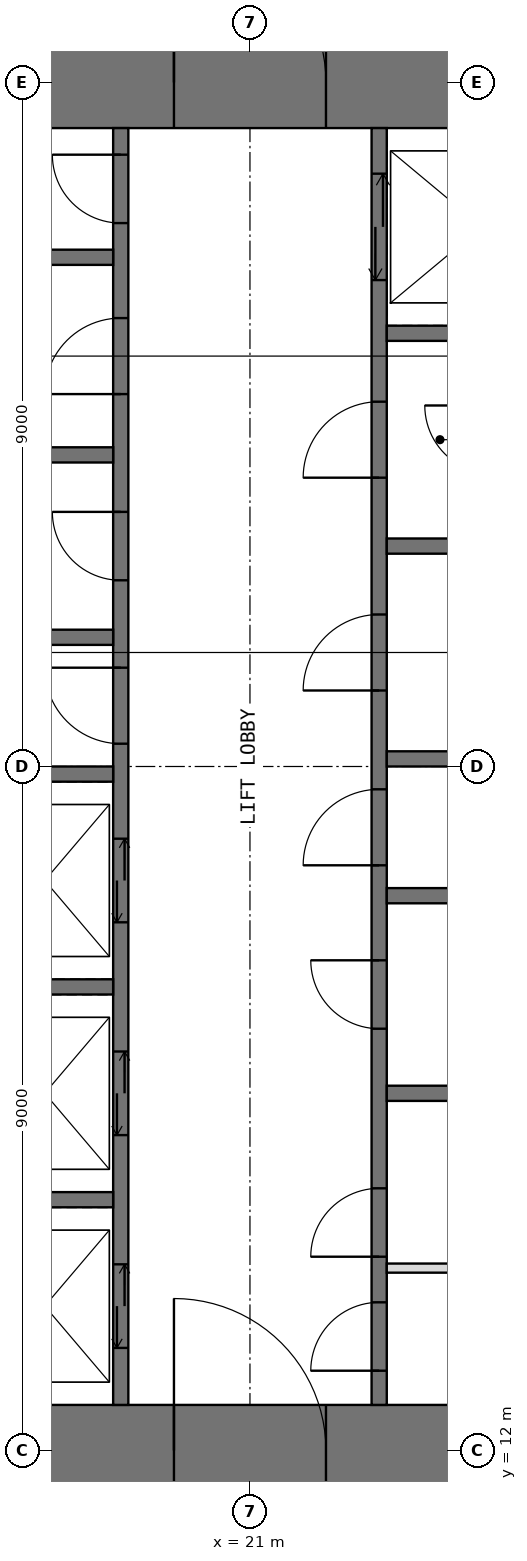
"""IFC4 building model, lengths in metres.
Left out: names, types, materials, properties, quantities, classifications, styles, units other than length and angle.
Written with IfcOpenShell. Run it as: python <this file> out.ifc"""

import sys

from ifc_helpers import new_model, si_unit, direction, frame, frame_2d, origin, place, context, subcontext, project, spatial, rectangle, extrude, element, fill, save


model = new_model("IFC4")
c1 = context("Model", 3, precision=1e-05, world=origin(), true_north=direction((0.0, 1.0)))
c2 = subcontext(c1, "Body", "Model", "MODEL_VIEW")
j1 = project(units=[si_unit("LENGTHUNIT", "METRE"), si_unit("PLANEANGLEUNIT", "RADIAN")], contexts=[c1])
p1 = place(None, origin())
s1 = spatial("IfcSite", under=j1, at=p1, CompositionType="ELEMENT")
p2 = place(p1, origin())
s2 = spatial("IfcBuilding", under=s1, at=p2, CompositionType="ELEMENT")
p3 = place(p2, frame((0.0, 0.0, 239.5)))
s3 = spatial("IfcBuildingStorey", under=s2, at=p3, CompositionType="ELEMENT", Elevation=239.5)
p4 = place(p3, frame((11.4, 12.0, -0.05), z_axis=(0.0, 0.0, 1.0), x_axis=(1.0, 0.0, 0.0)))
e1 = element("IfcWall", 1, at=p4, inside=s3, PredefinedType="SHEAR", context=c2, shape_type="SweptSolid", body=[
    extrude(rectangle(XDim=19.2, YDim=1.2, at=frame_2d((9.6, 0.0))), origin(), (0.0, 0.0, 1.0), 4.5),
])
p5 = place(p4, frame((8.6, 0.0, 0.05)))
e2 = element("IfcOpeningElement", 2, at=p5, cuts=e1, PredefinedType="OPENING", context=c2, shape_type="SweptSolid", body=[
    extrude(rectangle(XDim=2.0, YDim=2.2, at=frame_2d((1.0, 1.1))), frame((0.0, 0.61, 0.0), z_axis=(0.0, -1.0, 0.0), x_axis=(1.0, 0.0, 0.0)), (0.0, 0.0, 1.0), 1.22),
])
p6 = place(p3, frame((11.4, 30.0, -0.05), z_axis=(0.0, 0.0, 1.0), x_axis=(1.0, 0.0, 0.0)))
e3 = element("IfcWall", 3, at=p6, inside=s3, PredefinedType="SHEAR", context=c2, shape_type="SweptSolid", body=[
    extrude(rectangle(XDim=19.2, YDim=1.2, at=frame_2d((9.6, 0.0))), origin(), (0.0, 0.0, 1.0), 4.5),
])
p7 = place(p6, frame((8.6, 0.0, 0.05)))
e4 = element("IfcOpeningElement", 4, at=p7, cuts=e3, PredefinedType="OPENING", context=c2, shape_type="SweptSolid", body=[
    extrude(rectangle(XDim=2.0, YDim=2.2, at=frame_2d((1.0, 1.1))), frame((0.0, 0.61, 0.0), z_axis=(0.0, -1.0, 0.0), x_axis=(1.0, 0.0, 0.0)), (0.0, 0.0, 1.0), 1.22),
])
p8 = place(p3, frame((19.3, 12.6, -0.05), z_axis=(0.0, 0.0, 1.0), x_axis=(0.0, 1.0, 0.0)))
e5 = element("IfcWall", 5, at=p8, inside=s3, PredefinedType="SHEAR", context=c2, shape_type="SweptSolid", body=[
    extrude(rectangle(XDim=16.8, YDim=0.2, at=frame_2d((8.4, 0.0))), origin(), (0.0, 0.0, 1.0), 4.5),
])
p9 = place(p8, frame((8.7, 0.0, 0.05)))
e6 = element("IfcOpeningElement", 6, at=p9, cuts=e5, PredefinedType="OPENING", context=c2, shape_type="SweptSolid", body=[
    extrude(rectangle(XDim=1.0, YDim=2.2, at=frame_2d((0.5, 1.1))), frame((0.0, 0.11, 0.0), z_axis=(0.0, -1.0, 0.0), x_axis=(1.0, 0.0, 0.0)), (0.0, 0.0, 1.0), 0.22),
])
p10 = place(p8, frame((10.85, 0.0, 0.05)))
e7 = element("IfcOpeningElement", 7, at=p10, cuts=e5, PredefinedType="OPENING", context=c2, shape_type="SweptSolid", body=[
    extrude(rectangle(XDim=0.9, YDim=2.2, at=frame_2d((0.45, 1.1))), frame((0.0, 0.11, 0.0), z_axis=(0.0, -1.0, 0.0), x_axis=(1.0, 0.0, 0.0)), (0.0, 0.0, 1.0), 0.22),
])
p11 = place(p8, frame((13.3, 0.0, 0.05)))
e8 = element("IfcOpeningElement", 8, at=p11, cuts=e5, PredefinedType="OPENING", context=c2, shape_type="SweptSolid", body=[
    extrude(rectangle(XDim=1.0, YDim=2.2, at=frame_2d((0.5, 1.1))), frame((0.0, 0.11, 0.0), z_axis=(0.0, -1.0, 0.0), x_axis=(1.0, 0.0, 0.0)), (0.0, 0.0, 1.0), 0.22),
])
p12 = place(p8, frame((15.55, 0.0, 0.05)))
e9 = element("IfcOpeningElement", 9, at=p12, cuts=e5, PredefinedType="OPENING", context=c2, shape_type="SweptSolid", body=[
    extrude(rectangle(XDim=0.9, YDim=2.2, at=frame_2d((0.45, 1.1))), frame((0.0, 0.11, 0.0), z_axis=(0.0, -1.0, 0.0), x_axis=(1.0, 0.0, 0.0)), (0.0, 0.0, 1.0), 0.22),
])
p13 = place(p8, frame((0.75, 0.0, 0.05)))
e10 = element("IfcOpeningElement", 10, at=p13, cuts=e5, PredefinedType="OPENING", context=c2, shape_type="SweptSolid", body=[
    extrude(rectangle(XDim=1.1, YDim=2.2, at=frame_2d((0.55, 1.1))), frame((0.0, 0.11, 0.0), z_axis=(0.0, -1.0, 0.0), x_axis=(1.0, 0.0, 0.0)), (0.0, 0.0, 1.0), 0.22),
])
p14 = place(p8, frame((3.55, 0.0, 0.05)))
e11 = element("IfcOpeningElement", 11, at=p14, cuts=e5, PredefinedType="OPENING", context=c2, shape_type="SweptSolid", body=[
    extrude(rectangle(XDim=1.1, YDim=2.2, at=frame_2d((0.55, 1.1))), frame((0.0, 0.11, 0.0), z_axis=(0.0, -1.0, 0.0), x_axis=(1.0, 0.0, 0.0)), (0.0, 0.0, 1.0), 0.22),
])
p15 = place(p8, frame((6.35, 0.0, 0.05)))
e12 = element("IfcOpeningElement", 12, at=p15, cuts=e5, PredefinedType="OPENING", context=c2, shape_type="SweptSolid", body=[
    extrude(rectangle(XDim=1.1, YDim=2.2, at=frame_2d((0.55, 1.1))), frame((0.0, 0.11, 0.0), z_axis=(0.0, -1.0, 0.0), x_axis=(1.0, 0.0, 0.0)), (0.0, 0.0, 1.0), 0.22),
])
p16 = place(p3, frame((22.7, 12.6, -0.05), z_axis=(0.0, 0.0, 1.0), x_axis=(0.0, 1.0, 0.0)))
e13 = element("IfcWall", 13, at=p16, inside=s3, PredefinedType="SHEAR", context=c2, shape_type="SweptSolid", body=[
    extrude(rectangle(XDim=16.8, YDim=0.2, at=frame_2d((8.4, 0.0))), origin(), (0.0, 0.0, 1.0), 4.5),
])
p17 = place(p16, frame((0.45, 0.0, 0.05)))
e14 = element("IfcOpeningElement", 14, at=p17, cuts=e13, PredefinedType="OPENING", context=c2, shape_type="SweptSolid", body=[
    extrude(rectangle(XDim=0.9, YDim=2.2, at=frame_2d((0.45, 1.1))), frame((0.0, 0.11, 0.0), z_axis=(0.0, -1.0, 0.0), x_axis=(1.0, 0.0, 0.0)), (0.0, 0.0, 1.0), 0.22),
])
p18 = place(p16, frame((7.1, 0.0, 0.05)))
e15 = element("IfcOpeningElement", 15, at=p18, cuts=e13, PredefinedType="OPENING", context=c2, shape_type="SweptSolid", body=[
    extrude(rectangle(XDim=1.0, YDim=2.2, at=frame_2d((0.5, 1.1))), frame((0.0, 0.11, 0.0), z_axis=(0.0, -1.0, 0.0), x_axis=(1.0, 0.0, 0.0)), (0.0, 0.0, 1.0), 0.22),
])
p19 = place(p16, frame((1.95, 0.0, 0.05)))
e16 = element("IfcOpeningElement", 16, at=p19, cuts=e13, PredefinedType="OPENING", context=c2, shape_type="SweptSolid", body=[
    extrude(rectangle(XDim=0.9, YDim=2.2, at=frame_2d((0.45, 1.1))), frame((0.0, 0.11, 0.0), z_axis=(0.0, -1.0, 0.0), x_axis=(1.0, 0.0, 0.0)), (0.0, 0.0, 1.0), 0.22),
])
p20 = place(p16, frame((4.95, 0.0, 0.05)))
e17 = element("IfcOpeningElement", 17, at=p20, cuts=e13, PredefinedType="OPENING", context=c2, shape_type="SweptSolid", body=[
    extrude(rectangle(XDim=0.9, YDim=2.2, at=frame_2d((0.45, 1.1))), frame((0.0, 0.11, 0.0), z_axis=(0.0, -1.0, 0.0), x_axis=(1.0, 0.0, 0.0)), (0.0, 0.0, 1.0), 0.22),
])
p21 = place(p16, frame((9.4, 0.0, 0.05)))
e18 = element("IfcOpeningElement", 18, at=p21, cuts=e13, PredefinedType="OPENING", context=c2, shape_type="SweptSolid", body=[
    extrude(rectangle(XDim=1.0, YDim=2.2, at=frame_2d((0.5, 1.1))), frame((0.0, 0.11, 0.0), z_axis=(0.0, -1.0, 0.0), x_axis=(1.0, 0.0, 0.0)), (0.0, 0.0, 1.0), 0.22),
])
p22 = place(p16, frame((12.2, 0.0, 0.05)))
e19 = element("IfcOpeningElement", 19, at=p22, cuts=e13, PredefinedType="OPENING", context=c2, shape_type="SweptSolid", body=[
    extrude(rectangle(XDim=1.0, YDim=2.2, at=frame_2d((0.5, 1.1))), frame((0.0, 0.11, 0.0), z_axis=(0.0, -1.0, 0.0), x_axis=(1.0, 0.0, 0.0)), (0.0, 0.0, 1.0), 0.22),
])
p23 = place(p16, frame((14.8, 0.0, 0.05)))
e20 = element("IfcOpeningElement", 20, at=p23, cuts=e13, PredefinedType="OPENING", context=c2, shape_type="SweptSolid", body=[
    extrude(rectangle(XDim=1.4, YDim=2.4, at=frame_2d((0.7, 1.2))), frame((0.0, 0.11, 0.0), z_axis=(0.0, -1.0, 0.0), x_axis=(1.0, 0.0, 0.0)), (0.0, 0.0, 1.0), 0.22),
])
for number, where, z_axis, x_axis in (
    (21, (16.0, 15.3, -0.05), (0.0, 0.0, 1.0), (1.0, 0.0, 0.0)),
    (22, (16.0, 18.1, -0.05), (0.0, 0.0, 1.0), (1.0, 0.0, 0.0)),
    (23, (16.0, 20.9, -0.05), (0.0, 0.0, 1.0), (1.0, 0.0, 0.0)),
    (24, (16.0, 22.7, -0.05), (0.0, 0.0, 1.0), (1.0, 0.0, 0.0)),
    (25, (16.0, 25.1, -0.05), (0.0, 0.0, 1.0), (1.0, 0.0, 0.0)),
    (26, (16.0, 27.7, -0.05), (0.0, 0.0, 1.0), (1.0, 0.0, 0.0)),
    (27, (22.8, 16.7, -0.05), (0.0, 0.0, 1.0), (1.0, 0.0, 0.0)),
    (28, (22.8, 19.3, -0.05), (0.0, 0.0, 1.0), (1.0, 0.0, 0.0)),
    (29, (22.8, 21.1, -0.05), (0.0, 0.0, 1.0), (1.0, 0.0, 0.0)),
    (30, (22.8, 23.9, -0.05), (0.0, 0.0, 1.0), (1.0, 0.0, 0.0)),
    (31, (22.8, 26.7, -0.05), (0.0, 0.0, 1.0), (1.0, 0.0, 0.0)),
):
    element("IfcWall", number, at=place(p3, frame(where, z_axis=z_axis, x_axis=x_axis)), inside=s3, PredefinedType="SHEAR", context=c2, shape_type="SweptSolid", body=[
        extrude(rectangle(XDim=3.2, YDim=0.2, at=frame_2d((1.6, 0.0))), origin(), (0.0, 0.0, 1.0), 4.5),
    ])
p24 = place(p3, frame((22.8, 14.4, 0.0), z_axis=(0.0, 0.0, 1.0), x_axis=(1.0, 0.0, 0.0)))
e32 = element("IfcWall", 32, at=p24, inside=s3, PredefinedType="PARTITIONING", context=c2, shape_type="SweptSolid", body=[
    extrude(rectangle(XDim=3.2, YDim=0.12, at=frame_2d((1.6, 0.0))), origin(), (0.0, 0.0, 1.0), 4.25),
])
p25 = place(p5, origin())
e33 = element("IfcDoor", 33, at=p25, inside=s3, OperationType="DOUBLE_DOOR_SINGLE_SWING", PredefinedType="DOOR", context=c2, shape_type="SweptSolid", body=[
    extrude(rectangle(XDim=2.0, YDim=2.2, at=frame_2d((1.0, 1.1))), frame((0.0, 0.025, 0.0), z_axis=(0.0, -1.0, 0.0), x_axis=(1.0, 0.0, 0.0)), (0.0, 0.0, 1.0), 0.05),
])
fill(e2, e33)
p26 = place(p7, origin())
e34 = element("IfcDoor", 34, at=p26, inside=s3, OperationType="DOUBLE_DOOR_SINGLE_SWING", PredefinedType="DOOR", context=c2, shape_type="SweptSolid", body=[
    extrude(rectangle(XDim=2.0, YDim=2.2, at=frame_2d((1.0, 1.1))), frame((0.0, 0.025, 0.0), z_axis=(0.0, -1.0, 0.0), x_axis=(1.0, 0.0, 0.0)), (0.0, 0.0, 1.0), 0.05),
])
fill(e4, e34)
p27 = place(p17, origin())
e35 = element("IfcDoor", 35, at=p27, inside=s3, OperationType="SINGLE_SWING_LEFT", PredefinedType="DOOR", context=c2, shape_type="SweptSolid", body=[
    extrude(rectangle(XDim=0.9, YDim=2.2, at=frame_2d((0.45, 1.1))), frame((0.0, 0.025, 0.0), z_axis=(0.0, -1.0, 0.0), x_axis=(1.0, 0.0, 0.0)), (0.0, 0.0, 1.0), 0.05),
])
fill(e14, e35)
p28 = place(p9, origin())
e36 = element("IfcDoor", 36, at=p28, inside=s3, OperationType="SINGLE_SWING_RIGHT", PredefinedType="DOOR", context=c2, shape_type="SweptSolid", body=[
    extrude(rectangle(XDim=1.0, YDim=2.2, at=frame_2d((0.5, 1.1))), frame((0.0, 0.025, 0.0), z_axis=(0.0, -1.0, 0.0), x_axis=(1.0, 0.0, 0.0)), (0.0, 0.0, 1.0), 0.05),
])
fill(e6, e36)
p29 = place(p18, origin())
e37 = element("IfcDoor", 37, at=p29, inside=s3, OperationType="SINGLE_SWING_LEFT", PredefinedType="DOOR", context=c2, shape_type="SweptSolid", body=[
    extrude(rectangle(XDim=1.0, YDim=2.2, at=frame_2d((0.5, 1.1))), frame((0.0, 0.025, 0.0), z_axis=(0.0, -1.0, 0.0), x_axis=(1.0, 0.0, 0.0)), (0.0, 0.0, 1.0), 0.05),
])
fill(e15, e37)
p30 = place(p10, origin())
e38 = element("IfcDoor", 38, at=p30, inside=s3, OperationType="SINGLE_SWING_RIGHT", PredefinedType="DOOR", context=c2, shape_type="SweptSolid", body=[
    extrude(rectangle(XDim=0.9, YDim=2.2, at=frame_2d((0.45, 1.1))), frame((0.0, 0.025, 0.0), z_axis=(0.0, -1.0, 0.0), x_axis=(1.0, 0.0, 0.0)), (0.0, 0.0, 1.0), 0.05),
])
fill(e7, e38)
p31 = place(p11, origin())
e39 = element("IfcDoor", 39, at=p31, inside=s3, OperationType="SINGLE_SWING_LEFT", PredefinedType="DOOR", context=c2, shape_type="SweptSolid", body=[
    extrude(rectangle(XDim=1.0, YDim=2.2, at=frame_2d((0.5, 1.1))), frame((0.0, 0.025, 0.0), z_axis=(0.0, -1.0, 0.0), x_axis=(1.0, 0.0, 0.0)), (0.0, 0.0, 1.0), 0.05),
])
fill(e8, e39)
p32 = place(p12, origin())
e40 = element("IfcDoor", 40, at=p32, inside=s3, OperationType="SINGLE_SWING_RIGHT", PredefinedType="DOOR", context=c2, shape_type="SweptSolid", body=[
    extrude(rectangle(XDim=0.9, YDim=2.2, at=frame_2d((0.45, 1.1))), frame((0.0, 0.025, 0.0), z_axis=(0.0, -1.0, 0.0), x_axis=(1.0, 0.0, 0.0)), (0.0, 0.0, 1.0), 0.05),
])
fill(e9, e40)
p33 = place(p19, origin())
e41 = element("IfcDoor", 41, at=p33, inside=s3, OperationType="SINGLE_SWING_LEFT", PredefinedType="DOOR", context=c2, shape_type="SweptSolid", body=[
    extrude(rectangle(XDim=0.9, YDim=2.2, at=frame_2d((0.45, 1.1))), frame((0.0, 0.025, 0.0), z_axis=(0.0, -1.0, 0.0), x_axis=(1.0, 0.0, 0.0)), (0.0, 0.0, 1.0), 0.05),
])
fill(e16, e41)
p34 = place(p20, origin())
e42 = element("IfcDoor", 42, at=p34, inside=s3, OperationType="SINGLE_SWING_RIGHT", PredefinedType="DOOR", context=c2, shape_type="SweptSolid", body=[
    extrude(rectangle(XDim=0.9, YDim=2.2, at=frame_2d((0.45, 1.1))), frame((0.0, 0.025, 0.0), z_axis=(0.0, -1.0, 0.0), x_axis=(1.0, 0.0, 0.0)), (0.0, 0.0, 1.0), 0.05),
])
fill(e17, e42)
p35 = place(p21, origin())
e43 = element("IfcDoor", 43, at=p35, inside=s3, OperationType="SINGLE_SWING_LEFT", PredefinedType="DOOR", context=c2, shape_type="SweptSolid", body=[
    extrude(rectangle(XDim=1.0, YDim=2.2, at=frame_2d((0.5, 1.1))), frame((0.0, 0.025, 0.0), z_axis=(0.0, -1.0, 0.0), x_axis=(1.0, 0.0, 0.0)), (0.0, 0.0, 1.0), 0.05),
])
fill(e18, e43)
p36 = place(p22, origin())
e44 = element("IfcDoor", 44, at=p36, inside=s3, OperationType="SINGLE_SWING_LEFT", PredefinedType="DOOR", context=c2, shape_type="SweptSolid", body=[
    extrude(rectangle(XDim=1.0, YDim=2.2, at=frame_2d((0.5, 1.1))), frame((0.0, 0.025, 0.0), z_axis=(0.0, -1.0, 0.0), x_axis=(1.0, 0.0, 0.0)), (0.0, 0.0, 1.0), 0.05),
])
fill(e19, e44)
p37 = place(p13, origin())
e45 = element("IfcDoor", 45, at=p37, inside=s3, OperationType="DOUBLE_DOOR_SLIDING", PredefinedType="DOOR", context=c2, shape_type="SweptSolid", body=[
    extrude(rectangle(XDim=1.1, YDim=2.2, at=frame_2d((0.55, 1.1))), frame((0.0, 0.025, 0.0), z_axis=(0.0, -1.0, 0.0), x_axis=(1.0, 0.0, 0.0)), (0.0, 0.0, 1.0), 0.05),
])
fill(e10, e45)
p38 = place(p14, origin())
e46 = element("IfcDoor", 46, at=p38, inside=s3, OperationType="DOUBLE_DOOR_SLIDING", PredefinedType="DOOR", context=c2, shape_type="SweptSolid", body=[
    extrude(rectangle(XDim=1.1, YDim=2.2, at=frame_2d((0.55, 1.1))), frame((0.0, 0.025, 0.0), z_axis=(0.0, -1.0, 0.0), x_axis=(1.0, 0.0, 0.0)), (0.0, 0.0, 1.0), 0.05),
])
fill(e11, e46)
p39 = place(p15, origin())
e47 = element("IfcDoor", 47, at=p39, inside=s3, OperationType="DOUBLE_DOOR_SLIDING", PredefinedType="DOOR", context=c2, shape_type="SweptSolid", body=[
    extrude(rectangle(XDim=1.1, YDim=2.2, at=frame_2d((0.55, 1.1))), frame((0.0, 0.025, 0.0), z_axis=(0.0, -1.0, 0.0), x_axis=(1.0, 0.0, 0.0)), (0.0, 0.0, 1.0), 0.05),
])
fill(e12, e47)
p40 = place(p23, origin())
e48 = element("IfcDoor", 48, at=p40, inside=s3, OperationType="DOUBLE_DOOR_SLIDING", PredefinedType="DOOR", context=c2, shape_type="SweptSolid", body=[
    extrude(rectangle(XDim=1.4, YDim=2.4, at=frame_2d((0.7, 1.2))), frame((0.0, 0.025, 0.0), z_axis=(0.0, -1.0, 0.0), x_axis=(1.0, 0.0, 0.0)), (0.0, 0.0, 1.0), 0.05),
])
fill(e20, e48)
save(model, sys.argv[1])
